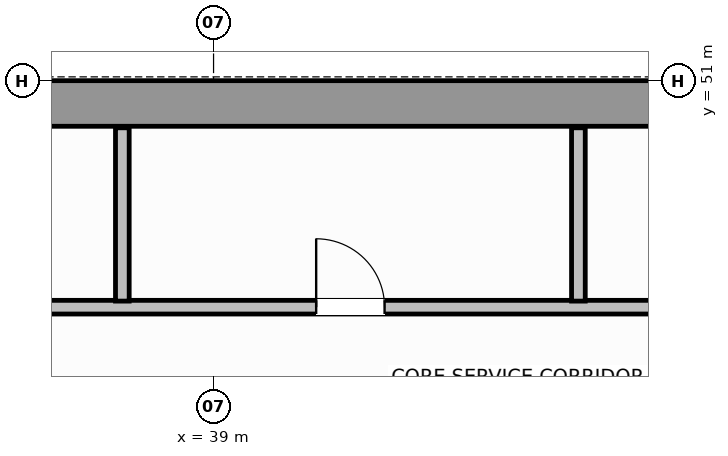
"""IFC4 building model, lengths in metres.
Left out: names, types, materials, properties, quantities, classifications, styles, units other than length and angle.
Written with IfcOpenShell. Run it as: python <this file> out.ifc"""

import sys

from ifc_helpers import new_model, si_unit, direction, frame, frame_2d, origin, place, context, subcontext, project, spatial, rectangle, extrude, source, transform, mapped, element, fill, save


model = new_model("IFC4")
c1 = context("Model", 3, precision=1e-05, world=origin(), true_north=direction((0.0, 1.0)))
c2 = subcontext(c1, "Body", "Model", "MODEL_VIEW")
j1 = project(units=[si_unit("LENGTHUNIT", "METRE"), si_unit("PLANEANGLEUNIT", "RADIAN")], contexts=[c1])
p1 = place(None, origin())
s1 = spatial("IfcSite", under=j1, at=p1, CompositionType="ELEMENT")
p2 = place(p1, origin())
s2 = spatial("IfcBuilding", under=s1, at=p2, CompositionType="ELEMENT")
p3 = place(p2, frame((0.0, 0.0, 188.0)))
s3 = spatial("IfcBuildingStorey", under=s2, at=p3, CompositionType="ELEMENT", Elevation=188.0)
p4 = place(p3, frame((34.002, 50.7, 0.0), z_axis=(0.0, 0.0, 1.0), x_axis=(1.0, 0.0, 0.0)))
e1 = element("IfcWall", 1, at=p4, inside=s3, PredefinedType="SHEAR", context=c2, shape_type="SweptSolid", body=[
    extrude(rectangle(XDim=19.694, YDim=0.6, at=frame_2d((9.847, 0.0))), origin(), (0.0, 0.0, 1.0), 3.8),
])
p5 = place(p3, frame((18.62, 48.02, 0.0), z_axis=(0.0, 0.0, 1.0), x_axis=(1.0, 0.0, 0.0)))
e2 = element("IfcWall", 2, at=p5, inside=s3, PredefinedType="PLUMBINGWALL", context=c2, shape_type="SweptSolid", body=[
    extrude(rectangle(XDim=30.76, YDim=0.18, at=frame_2d((15.38, 0.0))), origin(), (0.0, 0.0, 1.0), 3.58),
])
p6 = place(p5, frame((1.655, 0.0, 0.0)))
e3 = element("IfcOpeningElement", 3, at=p6, cuts=e2, PredefinedType="OPENING", context=c2, shape_type="SweptSolid", body=[
    extrude(rectangle(XDim=0.9, YDim=2.15, at=frame_2d((0.45, 1.075))), frame((0.0, 0.1, 0.0), z_axis=(0.0, -1.0, 0.0), x_axis=(1.0, 0.0, 0.0)), (0.0, 0.0, 1.0), 0.2),
])
p7 = place(p5, frame((6.03, 0.0, 0.0)))
e4 = element("IfcOpeningElement", 4, at=p7, cuts=e2, PredefinedType="OPENING", context=c2, shape_type="SweptSolid", body=[
    extrude(rectangle(XDim=0.9, YDim=2.15, at=frame_2d((0.45, 1.075))), frame((0.0, 0.1, 0.0), z_axis=(0.0, -1.0, 0.0), x_axis=(1.0, 0.0, 0.0)), (0.0, 0.0, 1.0), 0.2),
])
p8 = place(p5, frame((10.93, 0.0, 0.0)))
e5 = element("IfcOpeningElement", 5, at=p8, cuts=e2, PredefinedType="OPENING", context=c2, shape_type="SweptSolid", body=[
    extrude(rectangle(XDim=0.9, YDim=2.15, at=frame_2d((0.45, 1.075))), frame((0.0, 0.1, 0.0), z_axis=(0.0, -1.0, 0.0), x_axis=(1.0, 0.0, 0.0)), (0.0, 0.0, 1.0), 0.2),
])
p9 = place(p5, frame((16.13, 0.0, 0.0)))
e6 = element("IfcOpeningElement", 6, at=p9, cuts=e2, PredefinedType="OPENING", context=c2, shape_type="SweptSolid", body=[
    extrude(rectangle(XDim=0.9, YDim=2.15, at=frame_2d((0.45, 1.075))), frame((0.0, 0.1, 0.0), z_axis=(0.0, -1.0, 0.0), x_axis=(1.0, 0.0, 0.0)), (0.0, 0.0, 1.0), 0.2),
])
p10 = place(p5, frame((21.73, 0.0, 0.0)))
e7 = element("IfcOpeningElement", 7, at=p10, cuts=e2, PredefinedType="OPENING", context=c2, shape_type="SweptSolid", body=[
    extrude(rectangle(XDim=0.9, YDim=2.15, at=frame_2d((0.45, 1.075))), frame((0.0, 0.1, 0.0), z_axis=(0.0, -1.0, 0.0), x_axis=(1.0, 0.0, 0.0)), (0.0, 0.0, 1.0), 0.2),
])
p11 = place(p5, frame((27.505, 0.0, 0.0)))
e8 = element("IfcOpeningElement", 8, at=p11, cuts=e2, PredefinedType="OPENING", context=c2, shape_type="SweptSolid", body=[
    extrude(rectangle(XDim=0.9, YDim=2.15, at=frame_2d((0.45, 1.075))), frame((0.0, 0.1, 0.0), z_axis=(0.0, -1.0, 0.0), x_axis=(1.0, 0.0, 0.0)), (0.0, 0.0, 1.0), 0.2),
])
for number, where, z_axis, x_axis in (
    (9, (37.8, 48.1, 0.0), (0.0, 0.0, 1.0), (0.0, 1.0, 0.0)),
    (10, (43.8, 48.1, 0.0), (0.0, 0.0, 1.0), (0.0, 1.0, 0.0)),
):
    element("IfcWall", number, at=place(p3, frame(where, z_axis=z_axis, x_axis=x_axis)), inside=s3, PredefinedType="PLUMBINGWALL", context=c2, shape_type="SweptSolid", body=[
        extrude(rectangle(XDim=2.28, YDim=0.18, at=frame_2d((1.14, 0.0))), origin(), (0.0, 0.0, 1.0), 3.58),
    ])
m1 = source(origin(), c2, "Body", "SweptSolid", [
    extrude(rectangle(XDim=0.9, YDim=2.15, at=frame_2d((0.45, 1.075))), frame((0.0, 0.025, 0.0), z_axis=(0.0, -1.0, 0.0), x_axis=(1.0, 0.0, 0.0)), (0.0, 0.0, 1.0), 0.05),
])
p12 = place(p10, origin())
e11 = element("IfcDoor", 11, at=p12, inside=s3, OperationType="SINGLE_SWING_LEFT", PredefinedType="DOOR", context=c2, shape_type="MappedRepresentation", body=[
    mapped(m1, transform((0.0, 0.0, 0.0), scale=1.0)),
])
fill(e7, e11)
save(model, sys.argv[1])
